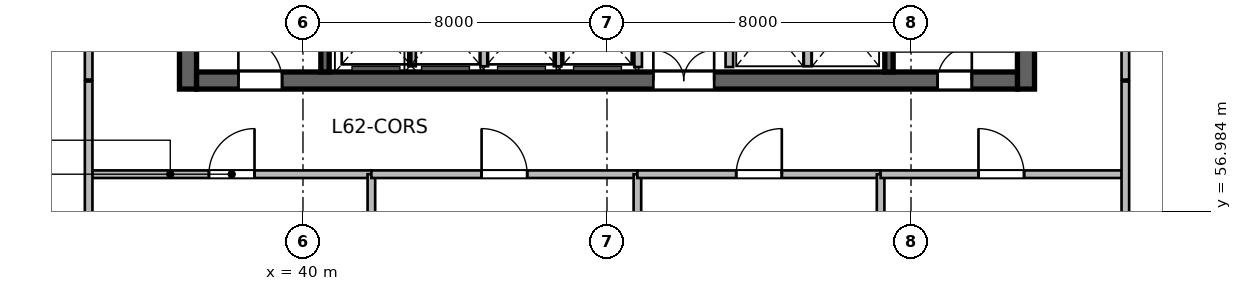
"""IFC4 building model, lengths in metres.
Left out: names, types, materials, properties, quantities, classifications, styles, units other than length and angle.
Written with IfcOpenShell. Run it as: python <this file> out.ifc"""

import sys

from ifc_helpers import new_model, si_unit, direction, frame, frame_2d, origin, place, context, subcontext, project, spatial, rectangle, extrude, source, transform, mapped, element, fill, save


model = new_model("IFC4")
c1 = context("Model", 3, precision=1e-05, world=origin(), true_north=direction((0.0, 1.0)))
c2 = subcontext(c1, "Body", "Model", "MODEL_VIEW")
j1 = project(units=[si_unit("LENGTHUNIT", "METRE"), si_unit("PLANEANGLEUNIT", "RADIAN")], contexts=[c1])
p1 = place(None, origin())
s1 = spatial("IfcSite", under=j1, at=p1, CompositionType="ELEMENT")
p2 = place(p1, origin())
s2 = spatial("IfcBuilding", under=s1, at=p2, CompositionType="ELEMENT")
p3 = place(p2, frame((0.0, 0.0, 254.7)))
s3 = spatial("IfcBuildingStorey", under=s2, at=p3, CompositionType="ELEMENT", Elevation=254.7)
m1 = source(origin(), c2, "Body", "SweptSolid", [
    extrude(rectangle(XDim=12.0, YDim=0.45, at=frame_2d((6.0, 0.0))), origin(), (0.0, 0.0, 1.0), 5.4),
])
for number, where, z_axis, x_axis in (
    (1, (36.975, 60.2, 0.0), (0.0, 0.0, 1.0), (0.0, 1.0, 0.0)),
    (2, (59.025, 60.2, 0.0), (0.0, 0.0, 1.0), (0.0, 1.0, 0.0)),
):
    element("IfcWall", number, at=place(p3, frame(where, z_axis=z_axis, x_axis=x_axis)), inside=s3, PredefinedType="SHEAR", context=c2, shape_type="MappedRepresentation", body=[
        mapped(m1, transform((0.0, 0.0, 0.0), scale=1.0)),
    ])
m2 = source(origin(), c2, "Body", "SweptSolid", [
    extrude(rectangle(XDim=21.6, YDim=0.45, at=frame_2d((10.8, 0.0))), origin(), (0.0, 0.0, 1.0), 5.4),
])
p4 = place(p3, frame((37.2, 60.425, 0.0), z_axis=(0.0, 0.0, 1.0), x_axis=(1.0, 0.0, 0.0)))
e3 = element("IfcWall", 3, at=p4, inside=s3, PredefinedType="SHEAR", context=c2, shape_type="MappedRepresentation", body=[
    mapped(m2, transform((0.0, 0.0, 0.0), scale=1.0)),
])
p5 = place(p4, frame((1.1, 0.0, 0.0)))
e4 = element("IfcOpeningElement", 4, at=p5, cuts=e3, PredefinedType="OPENING", context=c2, shape_type="SweptSolid", body=[
    extrude(rectangle(XDim=1.15, YDim=2.15, at=frame_2d((0.575, 1.075))), frame((0.0, 0.235, 0.0), z_axis=(0.0, -1.0, 0.0), x_axis=(1.0, 0.0, 0.0)), (0.0, 0.0, 1.0), 0.47),
])
p6 = place(p4, frame((19.5, 0.0, 0.0)))
e5 = element("IfcOpeningElement", 5, at=p6, cuts=e3, PredefinedType="OPENING", context=c2, shape_type="SweptSolid", body=[
    extrude(rectangle(XDim=0.9, YDim=2.1, at=frame_2d((0.45, 1.05))), frame((0.0, 0.235, 0.0), z_axis=(0.0, -1.0, 0.0), x_axis=(1.0, 0.0, 0.0)), (0.0, 0.0, 1.0), 0.47),
])
p7 = place(p4, frame((12.02, 0.0, 0.0)))
e6 = element("IfcOpeningElement", 6, at=p7, cuts=e3, PredefinedType="OPENING", context=c2, shape_type="SweptSolid", body=[
    extrude(rectangle(XDim=1.6, YDim=2.15, at=frame_2d((0.8, 1.075))), frame((0.0, 0.235, 0.0), z_axis=(0.0, -1.0, 0.0), x_axis=(1.0, 0.0, 0.0)), (0.0, 0.0, 1.0), 0.47),
])
m3 = source(origin(), c2, "Body", "SweptSolid", [
    extrude(rectangle(XDim=11.1, YDim=0.22, at=frame_2d((5.55, 0.0))), origin(), (0.0, 0.0, 1.0), 5.4),
])
p8 = place(p3, frame((40.58, 60.65, 0.0), z_axis=(0.0, 0.0, 1.0), x_axis=(0.0, 1.0, 0.0)))
e7 = element("IfcWall", 7, at=p8, inside=s3, PredefinedType="SHEAR", context=c2, shape_type="MappedRepresentation", body=[
    mapped(m3, transform((0.0, 0.0, 0.0), scale=1.0)),
])
p9 = place(p3, frame((55.42, 60.65, 0.0), z_axis=(0.0, 0.0, 1.0), x_axis=(0.0, 1.0, 0.0)))
e8 = element("IfcWall", 8, at=p9, inside=s3, PredefinedType="SHEAR", context=c2, shape_type="MappedRepresentation", body=[
    mapped(m3, transform((0.0, 0.0, 0.0), scale=1.0)),
])
p10 = place(p9, frame((9.595, 0.0, 0.0)))
e9 = element("IfcOpeningElement", 9, at=p10, cuts=e8, PredefinedType="OPENING", context=c2, shape_type="SweptSolid", body=[
    extrude(rectangle(XDim=1.15, YDim=2.15, at=frame_2d((0.575, 1.075))), frame((0.0, 0.12, 0.0), z_axis=(0.0, -1.0, 0.0), x_axis=(1.0, 0.0, 0.0)), (0.0, 0.0, 1.0), 0.24),
])
m4 = source(origin(), c2, "Body", "SweptSolid", [
    extrude(rectangle(XDim=2.24, YDim=0.2, at=frame_2d((1.12, 0.0))), origin(), (0.0, 0.0, 1.0), 5.15),
])
for number, where, z_axis, x_axis in (
    (10, (48.82, 60.78, 0.0), (0.0, 0.0, 1.0), (0.0, 1.0, 0.0)),
    (11, (51.22, 60.78, 0.0), (0.0, 0.0, 1.0), (0.0, 1.0, 0.0)),
):
    element("IfcWall", number, at=place(p3, frame(where, z_axis=z_axis, x_axis=x_axis)), inside=s3, PredefinedType="SOLIDWALL", context=c2, shape_type="MappedRepresentation", body=[
        mapped(m4, transform((0.0, 0.0, 0.0), scale=1.0)),
    ])
m5 = source(origin(), c2, "Body", "SweptSolid", [
    extrude(rectangle(XDim=2.2, YDim=0.2, at=frame_2d((1.1, 0.0))), origin(), (0.0, 0.0, 1.0), 5.15),
])
for number, where, z_axis, x_axis in (
    (12, (42.87, 60.8, 0.0), (0.0, 0.0, 1.0), (0.0, 1.0, 0.0)),
    (13, (44.77, 60.8, 0.0), (0.0, 0.0, 1.0), (0.0, 1.0, 0.0)),
    (14, (46.7, 60.8, 0.0), (0.0, 0.0, 1.0), (0.0, 1.0, 0.0)),
    (15, (53.28, 60.8, 0.0), (0.0, 0.0, 1.0), (0.0, 1.0, 0.0)),
):
    element("IfcWall", number, at=place(p3, frame(where, z_axis=z_axis, x_axis=x_axis)), inside=s3, PredefinedType="SOLIDWALL", context=c2, shape_type="MappedRepresentation", body=[
        mapped(m5, transform((0.0, 0.0, 0.0), scale=1.0)),
    ])
m6 = source(origin(), c2, "Body", "SweptSolid", [
    extrude(rectangle(XDim=7.35, YDim=0.2, at=frame_2d((3.675, 0.0))), origin(), (0.0, 0.0, 1.0), 4.824),
])
p11 = place(p3, frame((34.45, 57.96, 0.0), z_axis=(0.0, 0.0, 1.0), x_axis=(1.0, 0.0, 0.0)))
e16 = element("IfcWall", 16, at=p11, inside=s3, PredefinedType="SOLIDWALL", context=c2, shape_type="MappedRepresentation", body=[
    mapped(m6, transform((0.0, 0.0, 0.0), scale=1.0)),
])
p12 = place(p11, frame((3.075, 0.0, 0.0)))
e17 = element("IfcOpeningElement", 17, at=p12, cuts=e16, PredefinedType="OPENING", context=c2, shape_type="SweptSolid", body=[
    extrude(rectangle(XDim=1.2, YDim=2.15, at=frame_2d((0.6, 1.075))), frame((0.0, 0.11, 0.0), z_axis=(0.0, -1.0, 0.0), x_axis=(1.0, 0.0, 0.0)), (0.0, 0.0, 1.0), 0.22),
])
m7 = source(origin(), c2, "Body", "SweptSolid", [
    extrude(rectangle(XDim=6.229, YDim=0.2, at=frame_2d((3.115, 0.0))), origin(), (0.0, 0.0, 1.0), 5.15),
])
p13 = place(p3, frame((41.8, 51.731, 0.0), z_axis=(0.0, 0.0, 1.0), x_axis=(0.0, 1.0, 0.0)))
e18 = element("IfcWall", 18, at=p13, inside=s3, PredefinedType="SOLIDWALL", context=c2, shape_type="MappedRepresentation", body=[
    mapped(m7, transform((0.0, 0.0, 0.0), scale=1.0)),
])
m8 = source(origin(), c2, "Body", "SweptSolid", [
    extrude(rectangle(XDim=7.0, YDim=0.2, at=frame_2d((3.5, 0.0))), origin(), (0.0, 0.0, 1.0), 5.15),
])
p14 = place(p3, frame((41.8, 57.96, 0.0), z_axis=(0.0, 0.0, 1.0), x_axis=(1.0, 0.0, 0.0)))
e19 = element("IfcWall", 19, at=p14, inside=s3, PredefinedType="SOLIDWALL", context=c2, shape_type="MappedRepresentation", body=[
    mapped(m8, transform((0.0, 0.0, 0.0), scale=1.0)),
])
p15 = place(p14, frame((2.9, 0.0, 0.0)))
e20 = element("IfcOpeningElement", 20, at=p15, cuts=e19, PredefinedType="OPENING", context=c2, shape_type="SweptSolid", body=[
    extrude(rectangle(XDim=1.2, YDim=2.15, at=frame_2d((0.6, 1.075))), frame((0.0, 0.11, 0.0), z_axis=(0.0, -1.0, 0.0), x_axis=(1.0, 0.0, 0.0)), (0.0, 0.0, 1.0), 0.22),
])
m9 = source(origin(), c2, "Body", "SweptSolid", [
    extrude(rectangle(XDim=5.112, YDim=0.2, at=frame_2d((2.556, 0.0))), origin(), (0.0, 0.0, 1.0), 5.15),
])
p16 = place(p3, frame((48.8, 52.848, 0.0), z_axis=(0.0, 0.0, 1.0), x_axis=(0.0, 1.0, 0.0)))
e21 = element("IfcWall", 21, at=p16, inside=s3, PredefinedType="SOLIDWALL", context=c2, shape_type="MappedRepresentation", body=[
    mapped(m9, transform((0.0, 0.0, 0.0), scale=1.0)),
])
m10 = source(origin(), c2, "Body", "SweptSolid", [
    extrude(rectangle(XDim=6.4, YDim=0.2, at=frame_2d((3.2, 0.0))), origin(), (0.0, 0.0, 1.0), 5.15),
])
p17 = place(p3, frame((48.8, 57.96, 0.0), z_axis=(0.0, 0.0, 1.0), x_axis=(1.0, 0.0, 0.0)))
e22 = element("IfcWall", 22, at=p17, inside=s3, PredefinedType="SOLIDWALL", context=c2, shape_type="MappedRepresentation", body=[
    mapped(m10, transform((0.0, 0.0, 0.0), scale=1.0)),
])
p18 = place(p17, frame((2.6, 0.0, 0.0)))
e23 = element("IfcOpeningElement", 23, at=p18, cuts=e22, PredefinedType="OPENING", context=c2, shape_type="SweptSolid", body=[
    extrude(rectangle(XDim=1.2, YDim=2.15, at=frame_2d((0.6, 1.075))), frame((0.0, 0.11, 0.0), z_axis=(0.0, -1.0, 0.0), x_axis=(1.0, 0.0, 0.0)), (0.0, 0.0, 1.0), 0.22),
])
m11 = source(origin(), c2, "Body", "SweptSolid", [
    extrude(rectangle(XDim=6.647, YDim=0.2, at=frame_2d((3.324, 0.0))), origin(), (0.0, 0.0, 1.0), 5.15),
])
p19 = place(p3, frame((55.2, 51.312, 0.0), z_axis=(0.0, 0.0, 1.0), x_axis=(0.0, 1.0, 0.0)))
e24 = element("IfcWall", 24, at=p19, inside=s3, PredefinedType="SOLIDWALL", context=c2, shape_type="MappedRepresentation", body=[
    mapped(m11, transform((0.0, 0.0, 0.0), scale=1.0)),
])
m12 = source(origin(), c2, "Body", "SweptSolid", [
    extrude(rectangle(XDim=6.35, YDim=0.2, at=frame_2d((3.175, 0.0))), origin(), (0.0, 0.0, 1.0), 4.824),
])
p20 = place(p3, frame((55.2, 57.96, 0.0), z_axis=(0.0, 0.0, 1.0), x_axis=(1.0, 0.0, 0.0)))
e25 = element("IfcWall", 25, at=p20, inside=s3, PredefinedType="SOLIDWALL", context=c2, shape_type="MappedRepresentation", body=[
    mapped(m12, transform((0.0, 0.0, 0.0), scale=1.0)),
])
p21 = place(p20, frame((2.575, 0.0, 0.0)))
e26 = element("IfcOpeningElement", 26, at=p21, cuts=e25, PredefinedType="OPENING", context=c2, shape_type="SweptSolid", body=[
    extrude(rectangle(XDim=1.2, YDim=2.15, at=frame_2d((0.6, 1.075))), frame((0.0, 0.11, 0.0), z_axis=(0.0, -1.0, 0.0), x_axis=(1.0, 0.0, 0.0)), (0.0, 0.0, 1.0), 0.22),
])
m13 = source(origin(), c2, "Body", "SweptSolid", [
    extrude(rectangle(XDim=13.511, YDim=0.2, at=frame_2d((6.755, 0.0))), origin(), (0.0, 0.0, 1.0), 5.15),
])
p22 = place(p3, frame((34.36, 46.889, 0.0), z_axis=(0.0, 0.0, 1.0), x_axis=(0.0, 1.0, 0.0)))
e27 = element("IfcWall", 27, at=p22, inside=s3, PredefinedType="SOLIDWALL", context=c2, shape_type="MappedRepresentation", body=[
    mapped(m13, transform((0.0, 0.0, 0.0), scale=1.0)),
])
m14 = source(origin(), c2, "Body", "SweptSolid", [
    extrude(rectangle(XDim=5.05, YDim=0.2, at=frame_2d((2.525, 0.0))), origin(), (0.0, 0.0, 1.0), 5.15),
])
p23 = place(p3, frame((34.36, 60.45, 0.0), z_axis=(0.0, 0.0, 1.0), x_axis=(0.0, 1.0, 0.0)))
e28 = element("IfcWall", 28, at=p23, inside=s3, PredefinedType="SOLIDWALL", context=c2, shape_type="MappedRepresentation", body=[
    mapped(m14, transform((0.0, 0.0, 0.0), scale=1.0)),
])
p24 = place(p23, frame((1.875, 0.0, 0.0)))
e29 = element("IfcOpeningElement", 29, at=p24, cuts=e28, PredefinedType="OPENING", context=c2, shape_type="SweptSolid", body=[
    extrude(rectangle(XDim=1.3, YDim=2.15, at=frame_2d((0.65, 1.075))), frame((0.0, 0.11, 0.0), z_axis=(0.0, -1.0, 0.0), x_axis=(1.0, 0.0, 0.0)), (0.0, 0.0, 1.0), 0.22),
])
m15 = source(origin(), c2, "Body", "SweptSolid", [
    extrude(rectangle(XDim=13.207, YDim=0.2, at=frame_2d((6.604, 0.0))), origin(), (0.0, 0.0, 1.0), 4.508),
])
p25 = place(p3, frame((61.64, 47.193, 0.0), z_axis=(0.0, 0.0, 1.0), x_axis=(0.0, 1.0, 0.0)))
e30 = element("IfcWall", 30, at=p25, inside=s3, PredefinedType="SOLIDWALL", context=c2, shape_type="MappedRepresentation", body=[
    mapped(m15, transform((0.0, 0.0, 0.0), scale=1.0)),
])
p26 = place(p3, frame((61.64, 60.45, 0.0), z_axis=(0.0, 0.0, 1.0), x_axis=(0.0, 1.0, 0.0)))
e31 = element("IfcWall", 31, at=p26, inside=s3, PredefinedType="SOLIDWALL", context=c2, shape_type="MappedRepresentation", body=[
    mapped(m14, transform((0.0, 0.0, 0.0), scale=1.0)),
])
p27 = place(p26, frame((1.875, 0.0, 0.0)))
e32 = element("IfcOpeningElement", 32, at=p27, cuts=e31, PredefinedType="OPENING", context=c2, shape_type="SweptSolid", body=[
    extrude(rectangle(XDim=1.3, YDim=2.15, at=frame_2d((0.65, 1.075))), frame((0.0, 0.11, 0.0), z_axis=(0.0, -1.0, 0.0), x_axis=(1.0, 0.0, 0.0)), (0.0, 0.0, 1.0), 0.22),
])
m16 = source(origin(), c2, "Body", "SweptSolid", [
    extrude(rectangle(XDim=1.15, YDim=2.15, at=frame_2d((0.575, 1.075))), frame((0.0, 0.025, 0.0), z_axis=(0.0, -1.0, 0.0), x_axis=(1.0, 0.0, 0.0)), (0.0, 0.0, 1.0), 0.05),
])
p28 = place(p5, origin())
e33 = element("IfcDoor", 33, at=p28, inside=s3, OperationType="SINGLE_SWING_LEFT", PredefinedType="DOOR", context=c2, shape_type="MappedRepresentation", body=[
    mapped(m16, transform((0.0, 0.0, 0.0), scale=1.0)),
])
fill(e4, e33)
m17 = source(origin(), c2, "Body", "SweptSolid", [
    extrude(rectangle(XDim=0.9, YDim=2.1, at=frame_2d((0.45, 1.05))), frame((0.0, 0.025, 0.0), z_axis=(0.0, -1.0, 0.0), x_axis=(1.0, 0.0, 0.0)), (0.0, 0.0, 1.0), 0.05),
])
p29 = place(p6, origin())
e34 = element("IfcDoor", 34, at=p29, inside=s3, OperationType="SINGLE_SWING_RIGHT", PredefinedType="DOOR", context=c2, shape_type="MappedRepresentation", body=[
    mapped(m17, transform((0.0, 0.0, 0.0), scale=1.0)),
])
fill(e5, e34)
m18 = source(origin(), c2, "Body", "SweptSolid", [
    extrude(rectangle(XDim=1.6, YDim=2.15, at=frame_2d((0.8, 1.075))), frame((0.0, 0.025, 0.0), z_axis=(0.0, -1.0, 0.0), x_axis=(1.0, 0.0, 0.0)), (0.0, 0.0, 1.0), 0.05),
])
p30 = place(p7, origin())
e35 = element("IfcDoor", 35, at=p30, inside=s3, OperationType="DOUBLE_DOOR_SINGLE_SWING", PredefinedType="DOOR", context=c2, shape_type="MappedRepresentation", body=[
    mapped(m18, transform((0.0, 0.0, 0.0), scale=1.0)),
])
fill(e6, e35)
m19 = source(origin(), c2, "Body", "SweptSolid", [
    extrude(rectangle(XDim=1.2, YDim=2.15, at=frame_2d((0.6, 1.075))), frame((0.0, 0.025, 0.0), z_axis=(0.0, -1.0, 0.0), x_axis=(1.0, 0.0, 0.0)), (0.0, 0.0, 1.0), 0.05),
])
p31 = place(p12, origin())
e36 = element("IfcDoor", 36, at=p31, inside=s3, OperationType="SINGLE_SWING_RIGHT", PredefinedType="DOOR", context=c2, shape_type="MappedRepresentation", body=[
    mapped(m19, transform((0.0, 0.0, 0.0), scale=1.0)),
])
fill(e17, e36)
p32 = place(p15, origin())
e37 = element("IfcDoor", 37, at=p32, inside=s3, OperationType="SINGLE_SWING_LEFT", PredefinedType="DOOR", context=c2, shape_type="MappedRepresentation", body=[
    mapped(m19, transform((0.0, 0.0, 0.0), scale=1.0)),
])
fill(e20, e37)
p33 = place(p18, origin())
e38 = element("IfcDoor", 38, at=p33, inside=s3, OperationType="SINGLE_SWING_RIGHT", PredefinedType="DOOR", context=c2, shape_type="MappedRepresentation", body=[
    mapped(m19, transform((0.0, 0.0, 0.0), scale=1.0)),
])
fill(e23, e38)
p34 = place(p21, origin())
e39 = element("IfcDoor", 39, at=p34, inside=s3, OperationType="SINGLE_SWING_LEFT", PredefinedType="DOOR", context=c2, shape_type="MappedRepresentation", body=[
    mapped(m19, transform((0.0, 0.0, 0.0), scale=1.0)),
])
fill(e26, e39)
save(model, sys.argv[1])
